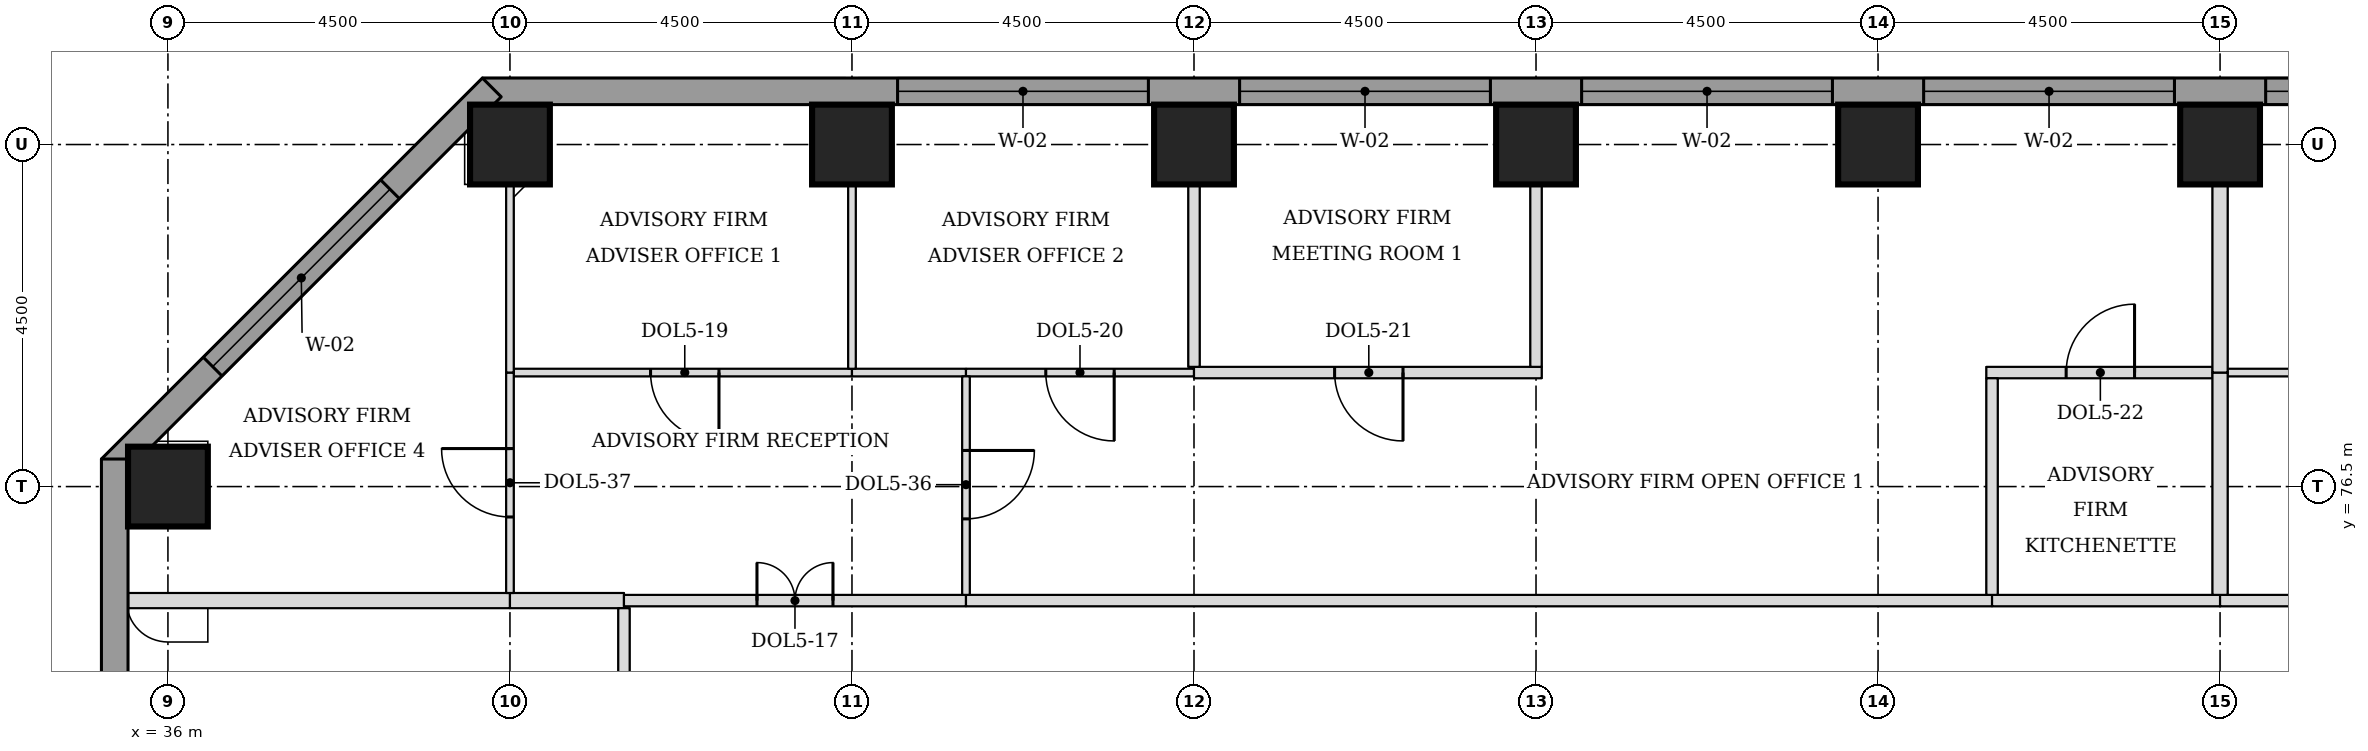
"""IFC4 building model, lengths in metres.
Left out: names, types, materials, properties, quantities, classifications, styles, units other than length and angle.
Written with IfcOpenShell. Run it as: python <this file> out.ifc"""

import sys

from ifc_helpers import new_model, si_unit, direction, frame, frame_2d, origin, origin_2d, place, context, subcontext, project, spatial, rectangle, extrude, element, fill, save


model = new_model("IFC4")
c1 = context("Model", 3, precision=1e-05, world=origin(), true_north=direction((0.0, 1.0)))
c2 = subcontext(c1, "Body", "Model", "MODEL_VIEW")
j1 = project(units=[si_unit("LENGTHUNIT", "METRE"), si_unit("PLANEANGLEUNIT", "RADIAN")], contexts=[c1])
p1 = place(None, origin())
s1 = spatial("IfcSite", under=j1, at=p1, CompositionType="ELEMENT")
p2 = place(p1, origin())
s2 = spatial("IfcBuilding", under=s1, at=p2, CompositionType="ELEMENT")
p3 = place(p2, frame((0.0, 0.0, 112.2)))
s3 = spatial("IfcBuildingStorey", under=s2, at=p3, CompositionType="ELEMENT", Elevation=112.2)
for number, where, z_axis, x_axis in (
    (1, (36.0, 76.5, 0.0), (0.0, 0.0, 1.0), (1.0, 0.0, 0.0)),
    (2, (40.5, 81.0, 0.0), (0.0, 0.0, 1.0), (1.0, 0.0, 0.0)),
    (3, (45.0, 81.0, 0.0), (0.0, 0.0, 1.0), (1.0, 0.0, 0.0)),
    (4, (49.5, 81.0, 0.0), (0.0, 0.0, 1.0), (1.0, 0.0, 0.0)),
    (5, (54.0, 81.0, 0.0), (0.0, 0.0, 1.0), (1.0, 0.0, 0.0)),
    (6, (58.5, 81.0, 0.0), (0.0, 0.0, 1.0), (1.0, 0.0, 0.0)),
    (7, (63.0, 81.0, 0.0), (0.0, 0.0, 1.0), (1.0, 0.0, 0.0)),
):
    element("IfcColumn", number, at=place(p3, frame(where, z_axis=z_axis, x_axis=x_axis)), inside=s3, PredefinedType="COLUMN", context=c2, shape_type="SweptSolid", body=[
        extrude(rectangle(XDim=1.05, YDim=1.05, at=origin_2d()), origin(), (0.0, 0.0, 1.0), 3.7),
    ])
p4 = place(p3, frame((72.362, 81.7, 0.0), z_axis=(0.0, 0.0, 1.0), x_axis=(-1.0, 0.0, 0.0)))
e8 = element("IfcWall", 8, at=p4, inside=s3, PredefinedType="STANDARD", context=c2, shape_type="SweptSolid", body=[
    extrude(rectangle(XDim=32.225, YDim=0.35, at=frame_2d((16.112, 0.0))), origin(), (0.0, 0.0, 1.0), 3.525),
])
p5 = place(p4, frame((5.462, 0.0, 0.9)))
e9 = element("IfcOpeningElement", 9, at=p5, cuts=e8, PredefinedType="OPENING", context=c2, shape_type="SweptSolid", body=[
    extrude(rectangle(XDim=3.3, YDim=1.9, at=frame_2d((1.65, 0.95))), frame((0.0, 0.185, 0.0), z_axis=(0.0, -1.0, 0.0), x_axis=(1.0, 0.0, 0.0)), (0.0, 0.0, 1.0), 0.37),
])
p6 = place(p4, frame((9.962, 0.0, 0.9)))
e10 = element("IfcOpeningElement", 10, at=p6, cuts=e8, PredefinedType="OPENING", context=c2, shape_type="SweptSolid", body=[
    extrude(rectangle(XDim=3.3, YDim=1.9, at=frame_2d((1.65, 0.95))), frame((0.0, 0.185, 0.0), z_axis=(0.0, -1.0, 0.0), x_axis=(1.0, 0.0, 0.0)), (0.0, 0.0, 1.0), 0.37),
])
p7 = place(p4, frame((14.462, 0.0, 0.9)))
e11 = element("IfcOpeningElement", 11, at=p7, cuts=e8, PredefinedType="OPENING", context=c2, shape_type="SweptSolid", body=[
    extrude(rectangle(XDim=3.3, YDim=1.9, at=frame_2d((1.65, 0.95))), frame((0.0, 0.185, 0.0), z_axis=(0.0, -1.0, 0.0), x_axis=(1.0, 0.0, 0.0)), (0.0, 0.0, 1.0), 0.37),
])
p8 = place(p4, frame((18.962, 0.0, 0.9)))
e12 = element("IfcOpeningElement", 12, at=p8, cuts=e8, PredefinedType="OPENING", context=c2, shape_type="SweptSolid", body=[
    extrude(rectangle(XDim=3.3, YDim=1.9, at=frame_2d((1.65, 0.95))), frame((0.0, 0.185, 0.0), z_axis=(0.0, -1.0, 0.0), x_axis=(1.0, 0.0, 0.0)), (0.0, 0.0, 1.0), 0.37),
])
p9 = place(p4, frame((23.462, 0.0, 0.9)))
e13 = element("IfcOpeningElement", 13, at=p9, cuts=e8, PredefinedType="OPENING", context=c2, shape_type="SweptSolid", body=[
    extrude(rectangle(XDim=3.3, YDim=1.9, at=frame_2d((1.65, 0.95))), frame((0.0, 0.185, 0.0), z_axis=(0.0, -1.0, 0.0), x_axis=(1.0, 0.0, 0.0)), (0.0, 0.0, 1.0), 0.37),
])
p10 = place(p3, frame((40.261, 81.751, 0.0), z_axis=(0.0, 0.0, 1.0), x_axis=(-0.707106781187, -0.707106781187, 0.0)))
e14 = element("IfcWall", 14, at=p10, inside=s3, PredefinedType="STANDARD", context=c2, shape_type="SweptSolid", body=[
    extrude(rectangle(XDim=7.089, YDim=0.35, at=frame_2d((3.544, 0.0))), origin(), (0.0, 0.0, 1.0), 3.525),
])
p11 = place(p10, frame((1.894, 0.0, 0.9)))
e15 = element("IfcOpeningElement", 15, at=p11, cuts=e14, PredefinedType="OPENING", context=c2, shape_type="SweptSolid", body=[
    extrude(rectangle(XDim=3.3, YDim=1.9, at=frame_2d((1.65, 0.95))), frame((0.0, 0.185, 0.0), z_axis=(0.0, -1.0, 0.0), x_axis=(1.0, 0.0, 0.0)), (0.0, 0.0, 1.0), 0.37),
])
p12 = place(p3, frame((35.3, 76.862, 0.0), z_axis=(0.0, 0.0, 1.0), x_axis=(0.0, -1.0, 0.0)))
e16 = element("IfcWall", 16, at=p12, inside=s3, PredefinedType="STANDARD", context=c2, shape_type="SweptSolid", body=[
    extrude(rectangle(XDim=13.337, YDim=0.35, at=frame_2d((6.669, 0.0))), origin(), (0.0, 0.0, 1.0), 3.525),
])
p13 = place(p12, frame((9.537, 0.0, 0.9)))
e17 = element("IfcOpeningElement", 17, at=p13, cuts=e16, PredefinedType="OPENING", context=c2, shape_type="SweptSolid", body=[
    extrude(rectangle(XDim=3.3, YDim=1.9, at=frame_2d((1.65, 0.95))), frame((0.0, 0.185, 0.0), z_axis=(0.0, -1.0, 0.0), x_axis=(1.0, 0.0, 0.0)), (0.0, 0.0, 1.0), 0.37),
])
p14 = place(p3, frame((35.475, 75.0, 0.0), z_axis=(0.0, 0.0, 1.0), x_axis=(1.0, 0.0, 0.0)))
e18 = element("IfcWall", 18, at=p14, inside=s3, PredefinedType="PARTITIONING", context=c2, shape_type="SweptSolid", body=[
    extrude(rectangle(XDim=5.025, YDim=0.2, at=frame_2d((2.512, 0.0))), origin(), (0.0, 0.0, 1.0), 3.55),
])
p15 = place(p3, frame((40.5, 75.0, 0.0), z_axis=(0.0, 0.0, 1.0), x_axis=(1.0, 0.0, 0.0)))
e19 = element("IfcWall", 19, at=p15, inside=s3, PredefinedType="PARTITIONING", context=c2, shape_type="SweptSolid", body=[
    extrude(rectangle(XDim=1.5, YDim=0.2, at=frame_2d((0.75, 0.0))), origin(), (0.0, 0.0, 1.0), 3.55),
])
p16 = place(p3, frame((42.0, 75.0, 0.0), z_axis=(0.0, 0.0, 1.0), x_axis=(1.0, 0.0, 0.0)))
e20 = element("IfcWall", 20, at=p16, inside=s3, PredefinedType="PARTITIONING", context=c2, shape_type="SweptSolid", body=[
    extrude(rectangle(XDim=4.5, YDim=0.15, at=frame_2d((2.25, 0.0))), origin(), (0.0, 0.0, 1.0), 3.55),
])
p17 = place(p16, frame((1.75, 0.0, 0.0)))
e21 = element("IfcOpeningElement", 21, at=p17, cuts=e20, PredefinedType="OPENING", context=c2, shape_type="SweptSolid", body=[
    extrude(rectangle(XDim=1.0, YDim=2.1, at=frame_2d((0.5, 1.05))), frame((0.0, 0.085, 0.0), z_axis=(0.0, -1.0, 0.0), x_axis=(1.0, 0.0, 0.0)), (0.0, 0.0, 1.0), 0.17),
])
p18 = place(p3, frame((46.5, 75.0, 0.0), z_axis=(0.0, 0.0, 1.0), x_axis=(1.0, 0.0, 0.0)))
e22 = element("IfcWall", 22, at=p18, inside=s3, PredefinedType="PARTITIONING", context=c2, shape_type="SweptSolid", body=[
    extrude(rectangle(XDim=13.5, YDim=0.15, at=frame_2d((6.75, 0.0))), origin(), (0.0, 0.0, 1.0), 3.55),
])
p19 = place(p3, frame((60.0, 75.0, 0.0), z_axis=(0.0, 0.0, 1.0), x_axis=(1.0, 0.0, 0.0)))
e23 = element("IfcWall", 23, at=p19, inside=s3, PredefinedType="PARTITIONING", context=c2, shape_type="SweptSolid", body=[
    extrude(rectangle(XDim=3.0, YDim=0.15, at=frame_2d((1.5, 0.0))), origin(), (0.0, 0.0, 1.0), 3.55),
])
p20 = place(p3, frame((63.0, 75.0, 0.0), z_axis=(0.0, 0.0, 1.0), x_axis=(1.0, 0.0, 0.0)))
e24 = element("IfcWall", 24, at=p20, inside=s3, PredefinedType="PARTITIONING", context=c2, shape_type="SweptSolid", body=[
    extrude(rectangle(XDim=7.5, YDim=0.15, at=frame_2d((3.75, 0.0))), origin(), (0.0, 0.0, 1.0), 3.55),
])
p21 = place(p20, frame((3.25, 0.0, 0.0)))
e25 = element("IfcOpeningElement", 25, at=p21, cuts=e24, PredefinedType="OPENING", context=c2, shape_type="SweptSolid", body=[
    extrude(rectangle(XDim=1.0, YDim=2.1, at=frame_2d((0.5, 1.05))), frame((0.0, 0.085, 0.0), z_axis=(0.0, -1.0, 0.0), x_axis=(1.0, 0.0, 0.0)), (0.0, 0.0, 1.0), 0.17),
])
p22 = place(p3, frame((40.55, 78.0, 0.0), z_axis=(0.0, 0.0, 1.0), x_axis=(1.0, 0.0, 0.0)))
e26 = element("IfcWall", 26, at=p22, inside=s3, PredefinedType="PARTITIONING", context=c2, shape_type="SweptSolid", body=[
    extrude(rectangle(XDim=4.45, YDim=0.1, at=frame_2d((2.225, 0.0))), origin(), (0.0, 0.0, 1.0), 3.55),
])
p23 = place(p22, frame((1.8, 0.0, 0.0)))
e27 = element("IfcOpeningElement", 27, at=p23, cuts=e26, PredefinedType="OPENING", context=c2, shape_type="SweptSolid", body=[
    extrude(rectangle(XDim=0.9, YDim=2.1, at=frame_2d((0.45, 1.05))), frame((0.0, 0.06, 0.0), z_axis=(0.0, -1.0, 0.0), x_axis=(1.0, 0.0, 0.0)), (0.0, 0.0, 1.0), 0.12),
])
p24 = place(p3, frame((45.0, 78.0, 0.0), z_axis=(0.0, 0.0, 1.0), x_axis=(1.0, 0.0, 0.0)))
e28 = element("IfcWall", 28, at=p24, inside=s3, PredefinedType="PARTITIONING", context=c2, shape_type="SweptSolid", body=[
    extrude(rectangle(XDim=1.5, YDim=0.1, at=frame_2d((0.75, 0.0))), origin(), (0.0, 0.0, 1.0), 3.55),
])
p25 = place(p3, frame((46.5, 78.0, 0.0), z_axis=(0.0, 0.0, 1.0), x_axis=(1.0, 0.0, 0.0)))
e29 = element("IfcWall", 29, at=p25, inside=s3, PredefinedType="PARTITIONING", context=c2, shape_type="SweptSolid", body=[
    extrude(rectangle(XDim=3.0, YDim=0.1, at=frame_2d((1.5, 0.0))), origin(), (0.0, 0.0, 1.0), 3.55),
])
p26 = place(p25, frame((1.05, 0.0, 0.0)))
e30 = element("IfcOpeningElement", 30, at=p26, cuts=e29, PredefinedType="OPENING", context=c2, shape_type="SweptSolid", body=[
    extrude(rectangle(XDim=0.9, YDim=2.1, at=frame_2d((0.45, 1.05))), frame((0.0, 0.06, 0.0), z_axis=(0.0, -1.0, 0.0), x_axis=(1.0, 0.0, 0.0)), (0.0, 0.0, 1.0), 0.12),
])
p27 = place(p3, frame((49.5, 78.0, 0.0), z_axis=(0.0, 0.0, 1.0), x_axis=(1.0, 0.0, 0.0)))
e31 = element("IfcWall", 31, at=p27, inside=s3, PredefinedType="PARTITIONING", context=c2, shape_type="SweptSolid", body=[
    extrude(rectangle(XDim=4.575, YDim=0.15, at=frame_2d((2.288, 0.0))), origin(), (0.0, 0.0, 1.0), 3.55),
])
p28 = place(p27, frame((1.85, 0.0, 0.0)))
e32 = element("IfcOpeningElement", 32, at=p28, cuts=e31, PredefinedType="OPENING", context=c2, shape_type="SweptSolid", body=[
    extrude(rectangle(XDim=0.9, YDim=2.1, at=frame_2d((0.45, 1.05))), frame((0.0, 0.085, 0.0), z_axis=(0.0, -1.0, 0.0), x_axis=(1.0, 0.0, 0.0)), (0.0, 0.0, 1.0), 0.17),
])
p29 = place(p3, frame((59.925, 78.0, 0.0), z_axis=(0.0, 0.0, 1.0), x_axis=(1.0, 0.0, 0.0)))
e33 = element("IfcWall", 33, at=p29, inside=s3, PredefinedType="PARTITIONING", context=c2, shape_type="SweptSolid", body=[
    extrude(rectangle(XDim=2.975, YDim=0.15, at=frame_2d((1.487, 0.0))), origin(), (0.0, 0.0, 1.0), 3.55),
])
p30 = place(p29, frame((1.05, 0.0, 0.0)))
e34 = element("IfcOpeningElement", 34, at=p30, cuts=e33, PredefinedType="OPENING", context=c2, shape_type="SweptSolid", body=[
    extrude(rectangle(XDim=0.9, YDim=2.1, at=frame_2d((0.45, 1.05))), frame((0.0, 0.085, 0.0), z_axis=(0.0, -1.0, 0.0), x_axis=(1.0, 0.0, 0.0)), (0.0, 0.0, 1.0), 0.17),
])
p31 = place(p3, frame((63.1, 78.0, 0.0), z_axis=(0.0, 0.0, 1.0), x_axis=(1.0, 0.0, 0.0)))
e35 = element("IfcWall", 35, at=p31, inside=s3, PredefinedType="PARTITIONING", context=c2, shape_type="SweptSolid", body=[
    extrude(rectangle(XDim=4.4, YDim=0.1, at=frame_2d((2.2, 0.0))), origin(), (0.0, 0.0, 1.0), 3.55),
])
p32 = place(p31, frame((1.75, 0.0, 0.0)))
e36 = element("IfcOpeningElement", 36, at=p32, cuts=e35, PredefinedType="OPENING", context=c2, shape_type="SweptSolid", body=[
    extrude(rectangle(XDim=0.9, YDim=2.1, at=frame_2d((0.45, 1.05))), frame((0.0, 0.06, 0.0), z_axis=(0.0, -1.0, 0.0), x_axis=(1.0, 0.0, 0.0)), (0.0, 0.0, 1.0), 0.12),
])
p33 = place(p3, frame((42.0, 57.075, 0.0), z_axis=(0.0, 0.0, 1.0), x_axis=(0.0, 1.0, 0.0)))
e37 = element("IfcWall", 37, at=p33, inside=s3, PredefinedType="PARTITIONING", context=c2, shape_type="SweptSolid", body=[
    extrude(rectangle(XDim=17.825, YDim=0.15, at=frame_2d((8.913, 0.0))), origin(), (0.0, 0.0, 1.0), 3.55),
])
p34 = place(p3, frame((46.5, 75.075, 0.0), z_axis=(0.0, 0.0, 1.0), x_axis=(0.0, 1.0, 0.0)))
e38 = element("IfcWall", 38, at=p34, inside=s3, PredefinedType="PARTITIONING", context=c2, shape_type="SweptSolid", body=[
    extrude(rectangle(XDim=2.875, YDim=0.1, at=frame_2d((1.438, 0.0))), origin(), (0.0, 0.0, 1.0), 3.022),
])
p35 = place(p34, frame((1.0, 0.0, 0.0)))
e39 = element("IfcOpeningElement", 39, at=p35, cuts=e38, PredefinedType="OPENING", context=c2, shape_type="SweptSolid", body=[
    extrude(rectangle(XDim=0.9, YDim=2.1, at=frame_2d((0.45, 1.05))), frame((0.0, 0.06, 0.0), z_axis=(0.0, -1.0, 0.0), x_axis=(1.0, 0.0, 0.0)), (0.0, 0.0, 1.0), 0.12),
])
p36 = place(p3, frame((60.0, 75.075, 0.0), z_axis=(0.0, 0.0, 1.0), x_axis=(0.0, 1.0, 0.0)))
e40 = element("IfcWall", 40, at=p36, inside=s3, PredefinedType="PARTITIONING", context=c2, shape_type="SweptSolid", body=[
    extrude(rectangle(XDim=2.85, YDim=0.15, at=frame_2d((1.425, 0.0))), origin(), (0.0, 0.0, 1.0), 3.55),
])
p37 = place(p3, frame((63.0, 75.075, 0.0), z_axis=(0.0, 0.0, 1.0), x_axis=(0.0, 1.0, 0.0)))
e41 = element("IfcWall", 41, at=p37, inside=s3, PredefinedType="PARTITIONING", context=c2, shape_type="SweptSolid", body=[
    extrude(rectangle(XDim=2.925, YDim=0.2, at=frame_2d((1.462, 0.0))), origin(), (0.0, 0.0, 1.0), 3.55),
])
p38 = place(p3, frame((40.5, 75.1, 0.0), z_axis=(0.0, 0.0, 1.0), x_axis=(0.0, 1.0, 0.0)))
e42 = element("IfcWall", 42, at=p38, inside=s3, PredefinedType="PARTITIONING", context=c2, shape_type="SweptSolid", body=[
    extrude(rectangle(XDim=2.9, YDim=0.1, at=frame_2d((1.45, 0.0))), origin(), (0.0, 0.0, 1.0), 3.55),
])
p39 = place(p38, frame((1.0, 0.0, 0.0)))
e43 = element("IfcOpeningElement", 43, at=p39, cuts=e42, PredefinedType="OPENING", context=c2, shape_type="SweptSolid", body=[
    extrude(rectangle(XDim=0.9, YDim=2.1, at=frame_2d((0.45, 1.05))), frame((0.0, 0.06, 0.0), z_axis=(0.0, -1.0, 0.0), x_axis=(1.0, 0.0, 0.0)), (0.0, 0.0, 1.0), 0.12),
])
p40 = place(p3, frame((40.5, 78.0, 0.0), z_axis=(0.0, 0.0, 1.0), x_axis=(0.0, 1.0, 0.0)))
e44 = element("IfcWall", 44, at=p40, inside=s3, PredefinedType="PARTITIONING", context=c2, shape_type="SweptSolid", body=[
    extrude(rectangle(XDim=2.475, YDim=0.1, at=frame_2d((1.238, 0.0))), origin(), (0.0, 0.0, 1.0), 3.55),
])
p41 = place(p3, frame((63.0, 78.0, 0.0), z_axis=(0.0, 0.0, 1.0), x_axis=(0.0, 1.0, 0.0)))
e45 = element("IfcWall", 45, at=p41, inside=s3, PredefinedType="PARTITIONING", context=c2, shape_type="SweptSolid", body=[
    extrude(rectangle(XDim=3.525, YDim=0.2, at=frame_2d((1.762, 0.0))), origin(), (0.0, 0.0, 1.0), 3.55),
])
p42 = place(p3, frame((45.0, 78.05, 0.0), z_axis=(0.0, 0.0, 1.0), x_axis=(0.0, 1.0, 0.0)))
e46 = element("IfcWall", 46, at=p42, inside=s3, PredefinedType="PARTITIONING", context=c2, shape_type="SweptSolid", body=[
    extrude(rectangle(XDim=3.475, YDim=0.1, at=frame_2d((1.737, 0.0))), origin(), (0.0, 0.0, 1.0), 3.55),
])
for number, where, z_axis, x_axis in (
    (47, (49.5, 78.075, 0.0), (0.0, 0.0, 1.0), (0.0, 1.0, 0.0)),
    (48, (54.0, 78.075, 0.0), (0.0, 0.0, 1.0), (0.0, 1.0, 0.0)),
):
    element("IfcWall", number, at=place(p3, frame(where, z_axis=z_axis, x_axis=x_axis)), inside=s3, PredefinedType="PARTITIONING", context=c2, shape_type="SweptSolid", body=[
        extrude(rectangle(XDim=3.45, YDim=0.15, at=frame_2d((1.725, 0.0))), origin(), (0.0, 0.0, 1.0), 3.55),
    ])
p43 = place(p5, origin())
e49 = element("IfcWindow", 49, at=p43, inside=s3, PartitioningType="SINGLE_PANEL", PredefinedType="WINDOW", context=c2, shape_type="SweptSolid", body=[
    extrude(rectangle(XDim=3.3, YDim=1.9, at=frame_2d((1.65, 0.95))), frame((0.0, 0.085, 0.0), z_axis=(0.0, -1.0, 0.0), x_axis=(1.0, 0.0, 0.0)), (0.0, 0.0, 1.0), 0.06),
])
fill(e9, e49)
p44 = place(p6, origin())
e50 = element("IfcWindow", 50, at=p44, inside=s3, PartitioningType="SINGLE_PANEL", PredefinedType="WINDOW", context=c2, shape_type="SweptSolid", body=[
    extrude(rectangle(XDim=3.3, YDim=1.9, at=frame_2d((1.65, 0.95))), frame((0.0, 0.085, 0.0), z_axis=(0.0, -1.0, 0.0), x_axis=(1.0, 0.0, 0.0)), (0.0, 0.0, 1.0), 0.06),
])
fill(e10, e50)
p45 = place(p7, origin())
e51 = element("IfcWindow", 51, at=p45, inside=s3, PartitioningType="SINGLE_PANEL", PredefinedType="WINDOW", context=c2, shape_type="SweptSolid", body=[
    extrude(rectangle(XDim=3.3, YDim=1.9, at=frame_2d((1.65, 0.95))), frame((0.0, 0.085, 0.0), z_axis=(0.0, -1.0, 0.0), x_axis=(1.0, 0.0, 0.0)), (0.0, 0.0, 1.0), 0.06),
])
fill(e11, e51)
p46 = place(p8, origin())
e52 = element("IfcWindow", 52, at=p46, inside=s3, PartitioningType="SINGLE_PANEL", PredefinedType="WINDOW", context=c2, shape_type="SweptSolid", body=[
    extrude(rectangle(XDim=3.3, YDim=1.9, at=frame_2d((1.65, 0.95))), frame((0.0, 0.085, 0.0), z_axis=(0.0, -1.0, 0.0), x_axis=(1.0, 0.0, 0.0)), (0.0, 0.0, 1.0), 0.06),
])
fill(e12, e52)
p47 = place(p9, origin())
e53 = element("IfcWindow", 53, at=p47, inside=s3, PartitioningType="SINGLE_PANEL", PredefinedType="WINDOW", context=c2, shape_type="SweptSolid", body=[
    extrude(rectangle(XDim=3.3, YDim=1.9, at=frame_2d((1.65, 0.95))), frame((0.0, 0.085, 0.0), z_axis=(0.0, -1.0, 0.0), x_axis=(1.0, 0.0, 0.0)), (0.0, 0.0, 1.0), 0.06),
])
fill(e13, e53)
p48 = place(p11, origin())
e54 = element("IfcWindow", 54, at=p48, inside=s3, PartitioningType="SINGLE_PANEL", PredefinedType="WINDOW", context=c2, shape_type="SweptSolid", body=[
    extrude(rectangle(XDim=3.3, YDim=1.9, at=frame_2d((1.65, 0.95))), frame((0.0, 0.085, 0.0), z_axis=(0.0, -1.0, 0.0), x_axis=(1.0, 0.0, 0.0)), (0.0, 0.0, 1.0), 0.06),
])
fill(e15, e54)
p49 = place(p17, origin())
e55 = element("IfcDoor", 55, at=p49, inside=s3, OperationType="DOUBLE_DOOR_SINGLE_SWING", PredefinedType="DOOR", context=c2, shape_type="SweptSolid", body=[
    extrude(rectangle(XDim=1.0, YDim=2.1, at=frame_2d((0.5, 1.05))), frame((0.0, 0.025, 0.0), z_axis=(0.0, -1.0, 0.0), x_axis=(1.0, 0.0, 0.0)), (0.0, 0.0, 1.0), 0.05),
])
fill(e21, e55)
p50 = place(p35, frame((0.9, 0.0, 0.0), z_axis=(0.0, 0.0, 1.0), x_axis=(-1.0, 0.0, 0.0)))
e56 = element("IfcDoor", 56, at=p50, inside=s3, OperationType="SINGLE_SWING_LEFT", PredefinedType="DOOR", context=c2, shape_type="SweptSolid", body=[
    extrude(rectangle(XDim=0.9, YDim=2.1, at=frame_2d((0.45, 1.05))), frame((0.0, 0.025, 0.0), z_axis=(0.0, -1.0, 0.0), x_axis=(1.0, 0.0, 0.0)), (0.0, 0.0, 1.0), 0.05),
])
fill(e39, e56)
p51 = place(p39, origin())
e57 = element("IfcDoor", 57, at=p51, inside=s3, OperationType="SINGLE_SWING_RIGHT", PredefinedType="DOOR", context=c2, shape_type="SweptSolid", body=[
    extrude(rectangle(XDim=0.9, YDim=2.1, at=frame_2d((0.45, 1.05))), frame((0.0, 0.025, 0.0), z_axis=(0.0, -1.0, 0.0), x_axis=(1.0, 0.0, 0.0)), (0.0, 0.0, 1.0), 0.05),
])
fill(e43, e57)
p52 = place(p23, frame((0.9, 0.0, 0.0), z_axis=(0.0, 0.0, 1.0), x_axis=(-1.0, 0.0, 0.0)))
e58 = element("IfcDoor", 58, at=p52, inside=s3, OperationType="SINGLE_SWING_LEFT", PredefinedType="DOOR", context=c2, shape_type="SweptSolid", body=[
    extrude(rectangle(XDim=0.9, YDim=2.1, at=frame_2d((0.45, 1.05))), frame((0.0, 0.025, 0.0), z_axis=(0.0, -1.0, 0.0), x_axis=(1.0, 0.0, 0.0)), (0.0, 0.0, 1.0), 0.05),
])
fill(e27, e58)
p53 = place(p26, frame((0.9, 0.0, 0.0), z_axis=(0.0, 0.0, 1.0), x_axis=(-1.0, 0.0, 0.0)))
e59 = element("IfcDoor", 59, at=p53, inside=s3, OperationType="SINGLE_SWING_LEFT", PredefinedType="DOOR", context=c2, shape_type="SweptSolid", body=[
    extrude(rectangle(XDim=0.9, YDim=2.1, at=frame_2d((0.45, 1.05))), frame((0.0, 0.025, 0.0), z_axis=(0.0, -1.0, 0.0), x_axis=(1.0, 0.0, 0.0)), (0.0, 0.0, 1.0), 0.05),
])
fill(e30, e59)
p54 = place(p30, origin())
e60 = element("IfcDoor", 60, at=p54, inside=s3, OperationType="SINGLE_SWING_RIGHT", PredefinedType="DOOR", context=c2, shape_type="SweptSolid", body=[
    extrude(rectangle(XDim=0.9, YDim=2.1, at=frame_2d((0.45, 1.05))), frame((0.0, 0.025, 0.0), z_axis=(0.0, -1.0, 0.0), x_axis=(1.0, 0.0, 0.0)), (0.0, 0.0, 1.0), 0.05),
])
fill(e34, e60)
p55 = place(p28, frame((0.9, 0.0, 0.0), z_axis=(0.0, 0.0, 1.0), x_axis=(-1.0, 0.0, 0.0)))
e61 = element("IfcDoor", 61, at=p55, inside=s3, OperationType="SINGLE_SWING_LEFT", PredefinedType="DOOR", context=c2, shape_type="SweptSolid", body=[
    extrude(rectangle(XDim=0.9, YDim=2.1, at=frame_2d((0.45, 1.05))), frame((0.0, 0.025, 0.0), z_axis=(0.0, -1.0, 0.0), x_axis=(1.0, 0.0, 0.0)), (0.0, 0.0, 1.0), 0.05),
])
fill(e32, e61)
save(model, sys.argv[1])
